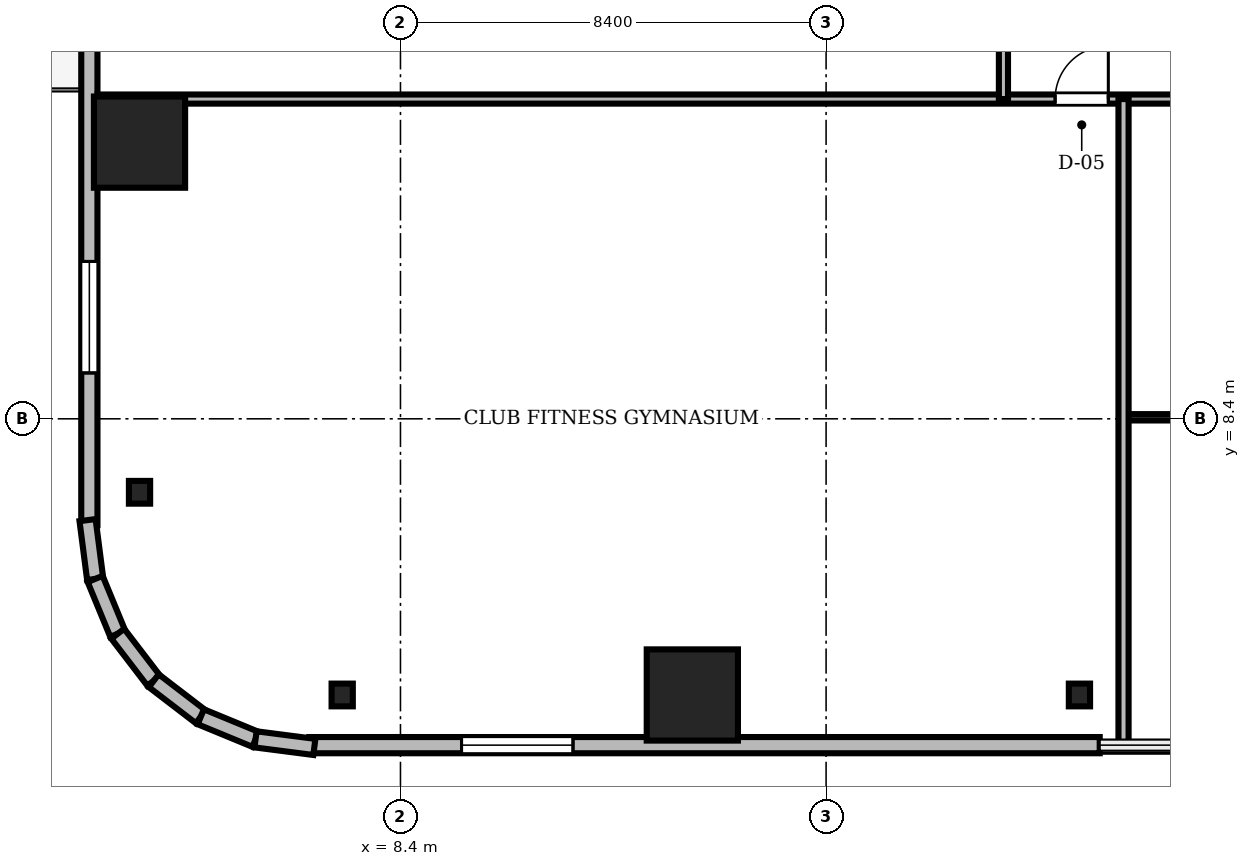
"""IFC4 building model, lengths in metres.
Left out: names, types, materials, properties, quantities, classifications, styles, units other than length and angle.
Written with IfcOpenShell. Run it as: python <this file> out.ifc"""

import sys

from ifc_helpers import new_model, si_unit, direction, frame, frame_2d, origin, origin_2d, place, context, subcontext, project, spatial, rectangle, i_section, extrude, source, transform, mapped, element, fill, save


model = new_model("IFC4")
c1 = context("Model", 3, precision=1e-05, world=origin(), true_north=direction((0.0, 1.0)))
c2 = subcontext(c1, "Body", "Model", "MODEL_VIEW")
j1 = project(units=[si_unit("LENGTHUNIT", "METRE"), si_unit("PLANEANGLEUNIT", "RADIAN")], contexts=[c1])
p1 = place(None, origin())
s1 = spatial("IfcSite", under=j1, at=p1, CompositionType="ELEMENT")
p2 = place(p1, origin())
s2 = spatial("IfcBuilding", under=s1, at=p2, CompositionType="ELEMENT")
p3 = place(p2, frame((0.0, 0.0, 67.75)))
s3 = spatial("IfcBuildingStorey", under=s2, at=p3, CompositionType="ELEMENT", Elevation=67.75)
m1 = source(origin(), c2, "Body", "SweptSolid", [
    extrude(rectangle(XDim=1.8, YDim=1.8, at=origin_2d()), origin(), (0.0, 0.0, 1.0), 3.41),
])
for number, where, z_axis, x_axis in (
    (1, (14.16, 2.95, 0.0), (0.0, 0.0, 1.0), (1.0, 0.0, 0.0)),
    (2, (3.25, 13.86, 0.0), (0.0, 0.0, 1.0), (1.0, 0.0, 0.0)),
):
    element("IfcColumn", number, at=place(p3, frame(where, z_axis=z_axis, x_axis=x_axis)), inside=s3, PredefinedType="COLUMN", context=c2, shape_type="MappedRepresentation", body=[
        mapped(m1, transform((0.0, 0.0, 0.0), scale=1.0)),
    ])
m2 = source(origin(), c2, "Body", "SweptSolid", [
    extrude(i_section(OverallWidth=0.419, OverallDepth=0.449, WebThickness=0.031, FlangeThickness=0.048, FilletRadius=0.015, at=origin_2d()), origin(), (0.0, 0.0, 1.0), 3.41),
])
for number, where, z_axis, x_axis in (
    (3, (7.25, 2.95, 0.0), (0.0, 0.0, 1.0), (1.0, 0.0, 0.0)),
    (4, (21.8, 2.95, 0.0), (0.0, 0.0, 1.0), (1.0, 0.0, 0.0)),
    (5, (3.25, 6.95, 0.0), (0.0, 0.0, 1.0), (1.0, 0.0, 0.0)),
):
    element("IfcColumn", number, at=place(p3, frame(where, z_axis=z_axis, x_axis=x_axis)), inside=s3, PredefinedType="COLUMN", context=c2, shape_type="MappedRepresentation", body=[
        mapped(m2, transform((0.0, 0.0, 0.0), scale=1.0)),
    ])
m3 = source(origin(), c2, "Body", "SweptSolid", [
    extrude(rectangle(XDim=15.6, YDim=0.32, at=frame_2d((7.8, 0.0))), origin(), (0.0, 0.0, 1.0), 3.41),
])
p4 = place(p3, frame((6.6, 1.96, 0.0), z_axis=(0.0, 0.0, 1.0), x_axis=(1.0, 0.0, 0.0)))
e6 = element("IfcWall", 6, at=p4, inside=s3, PredefinedType="SOLIDWALL", context=c2, shape_type="MappedRepresentation", body=[
    mapped(m3, transform((0.0, 0.0, 0.0), scale=1.0)),
])
m4 = source(origin(), c2, "Body", "SweptSolid", [
    extrude(rectangle(XDim=2.2, YDim=2.4, at=frame_2d((1.1, 1.2))), frame((0.0, 0.17, 0.0), z_axis=(0.0, -1.0, 0.0), x_axis=(1.0, 0.0, 0.0)), (0.0, 0.0, 1.0), 0.34),
])
p5 = place(p4, frame((3.005, 0.0, 0.72)))
e7 = element("IfcOpeningElement", 7, at=p5, cuts=e6, PredefinedType="OPENING", context=c2, shape_type="MappedRepresentation", body=[
    mapped(m4, transform((0.0, 0.0, 0.0), scale=1.0)),
])
p6 = place(p3, frame((2.26, 21.9, 0.0), z_axis=(0.0, 0.0, 1.0), x_axis=(0.0, -1.0, 0.0)))
e8 = element("IfcWall", 8, at=p6, inside=s3, PredefinedType="SOLIDWALL", context=c2, shape_type="MappedRepresentation", body=[
    mapped(m3, transform((0.0, 0.0, 0.0), scale=1.0)),
])
m5 = source(origin(), c2, "Body", "SweptSolid", [
    extrude(rectangle(XDim=1.4, YDim=2.3, at=frame_2d((0.7, 1.15))), frame((0.0, 0.17, 0.0), z_axis=(0.0, -1.0, 0.0), x_axis=(1.0, 0.0, 0.0)), (0.0, 0.0, 1.0), 0.34),
])
p7 = place(p6, frame((4.59, 0.0, 0.0)))
e9 = element("IfcOpeningElement", 9, at=p7, cuts=e8, PredefinedType="OPENING", context=c2, shape_type="MappedRepresentation", body=[
    mapped(m5, transform((0.0, 0.0, 0.0), scale=1.0)),
])
p8 = place(p6, frame((10.395, 0.0, 0.72)))
e10 = element("IfcOpeningElement", 10, at=p8, cuts=e8, PredefinedType="OPENING", context=c2, shape_type="MappedRepresentation", body=[
    mapped(m4, transform((0.0, 0.0, 0.0), scale=1.0)),
])
m6 = source(origin(), c2, "Body", "SweptSolid", [
    extrude(rectangle(XDim=1.171, YDim=0.32, at=frame_2d((0.585, 0.0))), origin(), (0.0, 0.0, 1.0), 3.41),
])
p9 = place(p3, frame((2.224, 6.401, 0.0), z_axis=(0.0, 0.0, 1.0), x_axis=(0.128269133229, -0.991739395941, 0.0)))
e11 = element("IfcWall", 11, at=p9, inside=s3, PredefinedType="SOLIDWALL", context=c2, shape_type="MappedRepresentation", body=[
    mapped(m6, transform((0.0, 0.0, 0.0), scale=1.0)),
])
m7 = source(origin(), c2, "Body", "SweptSolid", [
    extrude(rectangle(XDim=1.169, YDim=0.32, at=frame_2d((0.584, 0.0))), origin(), (0.0, 0.0, 1.0), 3.41),
])
for number, where, z_axis, x_axis in (
    (12, (2.375, 5.24, 0.0), (0.0, 0.0, 1.0), (0.381, -0.925, 0.0)),
    (13, (2.82, 4.159, 0.0), (0.0, 0.0, 1.0), (0.608, -0.794, 0.0)),
):
    element("IfcWall", number, at=place(p3, frame(where, z_axis=z_axis, x_axis=x_axis)), inside=s3, PredefinedType="SOLIDWALL", context=c2, shape_type="MappedRepresentation", body=[
        mapped(m7, transform((0.0, 0.0, 0.0), scale=1.0)),
    ])
m8 = source(origin(), c2, "Body", "SweptSolid", [
    extrude(rectangle(XDim=1.169, YDim=0.32, at=frame_2d((0.584, 0.0))), origin(), (0.0, 0.0, 1.0), 3.41),
])
p10 = place(p3, frame((3.531, 3.231, 0.0), z_axis=(0.0, 0.0, 1.0), x_axis=(0.793663520347, -0.608356981114, 0.0)))
e14 = element("IfcWall", 14, at=p10, inside=s3, PredefinedType="SOLIDWALL", context=c2, shape_type="MappedRepresentation", body=[
    mapped(m8, transform((0.0, 0.0, 0.0), scale=1.0)),
])
m9 = source(origin(), c2, "Body", "SweptSolid", [
    extrude(rectangle(XDim=1.169, YDim=0.32, at=frame_2d((0.585, 0.0))), origin(), (0.0, 0.0, 1.0), 3.41),
])
p11 = place(p3, frame((4.459, 2.52, 0.0), z_axis=(0.0, 0.0, 1.0), x_axis=(0.924479075121, -0.381232789334, 0.0)))
e15 = element("IfcWall", 15, at=p11, inside=s3, PredefinedType="SOLIDWALL", context=c2, shape_type="MappedRepresentation", body=[
    mapped(m9, transform((0.0, 0.0, 0.0), scale=1.0)),
])
m10 = source(origin(), c2, "Body", "SweptSolid", [
    extrude(rectangle(XDim=1.17, YDim=0.32, at=frame_2d((0.585, 0.0))), origin(), (0.0, 0.0, 1.0), 3.41),
])
p12 = place(p3, frame((5.54, 2.074, 0.0), z_axis=(0.0, 0.0, 1.0), x_axis=(0.991762485493, -0.128090485085, 0.0)))
e16 = element("IfcWall", 16, at=p12, inside=s3, PredefinedType="SOLIDWALL", context=c2, shape_type="MappedRepresentation", body=[
    mapped(m10, transform((0.0, 0.0, 0.0), scale=1.0)),
])
m11 = source(origin(), c2, "Body", "SweptSolid", [
    extrude(rectangle(XDim=46.156, YDim=0.18, at=frame_2d((23.078, 0.0))), origin(), (0.0, 0.0, 1.0), 2.652),
])
p13 = place(p3, frame((2.422, 14.71, 0.0), z_axis=(0.0, 0.0, 1.0), x_axis=(1.0, 0.0, 0.0)))
e17 = element("IfcWall", 17, at=p13, inside=s3, PredefinedType="PARTITIONING", context=c2, shape_type="MappedRepresentation", body=[
    mapped(m11, transform((0.0, 0.0, 0.0), scale=1.0)),
])
m12 = source(origin(), c2, "Body", "SweptSolid", [
    extrude(rectangle(XDim=1.05, YDim=2.2, at=frame_2d((0.525, 1.1))), frame((0.0, 0.1, 0.0), z_axis=(0.0, -1.0, 0.0), x_axis=(1.0, 0.0, 0.0)), (0.0, 0.0, 1.0), 0.2),
])
p14 = place(p13, frame((18.898, 0.0, 0.0)))
e18 = element("IfcOpeningElement", 18, at=p14, cuts=e17, PredefinedType="OPENING", context=c2, shape_type="MappedRepresentation", body=[
    mapped(m12, transform((0.0, 0.0, 0.0), scale=1.0)),
])
p15 = place(p13, frame((22.505, 0.0, 0.0)))
e19 = element("IfcOpeningElement", 19, at=p15, cuts=e17, PredefinedType="OPENING", context=c2, shape_type="MappedRepresentation", body=[
    mapped(m12, transform((0.0, 0.0, 0.0), scale=1.0)),
])
p16 = place(p13, frame((28.814, 0.0, 0.0)))
e20 = element("IfcOpeningElement", 20, at=p16, cuts=e17, PredefinedType="OPENING", context=c2, shape_type="MappedRepresentation", body=[
    mapped(m12, transform((0.0, 0.0, 0.0), scale=1.0)),
])
p17 = place(p13, frame((34.368, 0.0, 0.0)))
e21 = element("IfcOpeningElement", 21, at=p17, cuts=e17, PredefinedType="OPENING", context=c2, shape_type="MappedRepresentation", body=[
    mapped(m12, transform((0.0, 0.0, 0.0), scale=1.0)),
])
p18 = place(p13, frame((40.998, 0.0, 0.0)))
e22 = element("IfcOpeningElement", 22, at=p18, cuts=e17, PredefinedType="OPENING", context=c2, shape_type="MappedRepresentation", body=[
    mapped(m12, transform((0.0, 0.0, 0.0), scale=1.0)),
])
m13 = source(origin(), c2, "Body", "SweptSolid", [
    extrude(rectangle(XDim=13.84, YDim=0.18, at=frame_2d((6.92, 0.0))), origin(), (0.0, 0.0, 1.0), 2.802),
])
p19 = place(p3, frame((20.3, 14.71, 0.0), z_axis=(0.0, 0.0, 1.0), x_axis=(0.0, 1.0, 0.0)))
e23 = element("IfcWall", 23, at=p19, inside=s3, PredefinedType="PARTITIONING", context=c2, shape_type="MappedRepresentation", body=[
    mapped(m13, transform((0.0, 0.0, 0.0), scale=1.0)),
])
p20 = place(p19, frame((2.903, 0.0, 0.0)))
e24 = element("IfcOpeningElement", 24, at=p20, cuts=e23, PredefinedType="OPENING", context=c2, shape_type="MappedRepresentation", body=[
    mapped(m12, transform((0.0, 0.0, 0.0), scale=1.0)),
])
p21 = place(p19, frame((9.748, 0.0, 0.0)))
e25 = element("IfcOpeningElement", 25, at=p21, cuts=e23, PredefinedType="OPENING", context=c2, shape_type="MappedRepresentation", body=[
    mapped(m12, transform((0.0, 0.0, 0.0), scale=1.0)),
])
m14 = source(origin(), c2, "Body", "SweptSolid", [
    extrude(rectangle(XDim=5.553, YDim=0.125, at=frame_2d((2.776, 0.0))), origin(), (0.0, 0.0, 1.0), 2.802),
])
p22 = place(p3, frame((22.67, 8.43, 0.0), z_axis=(0.0, 0.0, 1.0), x_axis=(1.0, 0.0, 0.0)))
e26 = element("IfcWall", 26, at=p22, inside=s3, PredefinedType="PARTITIONING", context=c2, shape_type="MappedRepresentation", body=[
    mapped(m14, transform((0.0, 0.0, 0.0), scale=1.0)),
])
m15 = source(origin(), c2, "Body", "SweptSolid", [
    extrude(rectangle(XDim=0.95, YDim=2.15, at=frame_2d((0.475, 1.075))), frame((0.0, 0.073, 0.0), z_axis=(0.0, -1.0, 0.0), x_axis=(1.0, 0.0, 0.0)), (0.0, 0.0, 1.0), 0.145),
])
p23 = place(p22, frame((2.297, 0.0, 0.0)))
e27 = element("IfcOpeningElement", 27, at=p23, cuts=e26, PredefinedType="OPENING", context=c2, shape_type="MappedRepresentation", body=[
    mapped(m15, transform((0.0, 0.0, 0.0), scale=1.0)),
])
m16 = source(origin(), c2, "Body", "SweptSolid", [
    extrude(rectangle(XDim=12.78, YDim=0.2, at=frame_2d((6.39, 0.0))), origin(), (0.0, 0.0, 1.0), 2.652),
])
p24 = place(p3, frame((22.67, 1.93, 0.0), z_axis=(0.0, 0.0, 1.0), x_axis=(0.0, 1.0, 0.0)))
e28 = element("IfcWall", 28, at=p24, inside=s3, PredefinedType="PARTITIONING", context=c2, shape_type="MappedRepresentation", body=[
    mapped(m16, transform((0.0, 0.0, 0.0), scale=1.0)),
])
m17 = source(origin(), c2, "Body", "SweptSolid", [
    extrude(rectangle(XDim=2.2, YDim=2.4, at=frame_2d((1.1, 1.2))), frame((0.0, 0.03, 0.0), z_axis=(0.0, -1.0, 0.0), x_axis=(1.0, 0.0, 0.0)), (0.0, 0.0, 1.0), 0.06),
])
p25 = place(p5, origin())
e29 = element("IfcWindow", 29, at=p25, inside=s3, PartitioningType="SINGLE_PANEL", PredefinedType="WINDOW", context=c2, shape_type="MappedRepresentation", body=[
    mapped(m17, transform((0.0, 0.0, 0.0), scale=1.0)),
])
fill(e7, e29)
p26 = place(p8, origin())
e30 = element("IfcWindow", 30, at=p26, inside=s3, PartitioningType="SINGLE_PANEL", PredefinedType="WINDOW", context=c2, shape_type="MappedRepresentation", body=[
    mapped(m17, transform((0.0, 0.0, 0.0), scale=1.0)),
])
fill(e10, e30)
m18 = source(origin(), c2, "Body", "SweptSolid", [
    extrude(rectangle(XDim=1.05, YDim=2.2, at=frame_2d((0.525, 1.1))), frame((0.0, 0.025, 0.0), z_axis=(0.0, -1.0, 0.0), x_axis=(1.0, 0.0, 0.0)), (0.0, 0.0, 1.0), 0.05),
])
p27 = place(p14, origin())
e31 = element("IfcDoor", 31, at=p27, inside=s3, OperationType="SINGLE_SWING_RIGHT", PredefinedType="DOOR", context=c2, shape_type="MappedRepresentation", body=[
    mapped(m18, transform((0.0, 0.0, 0.0), scale=1.0)),
])
fill(e18, e31)
save(model, sys.argv[1])
